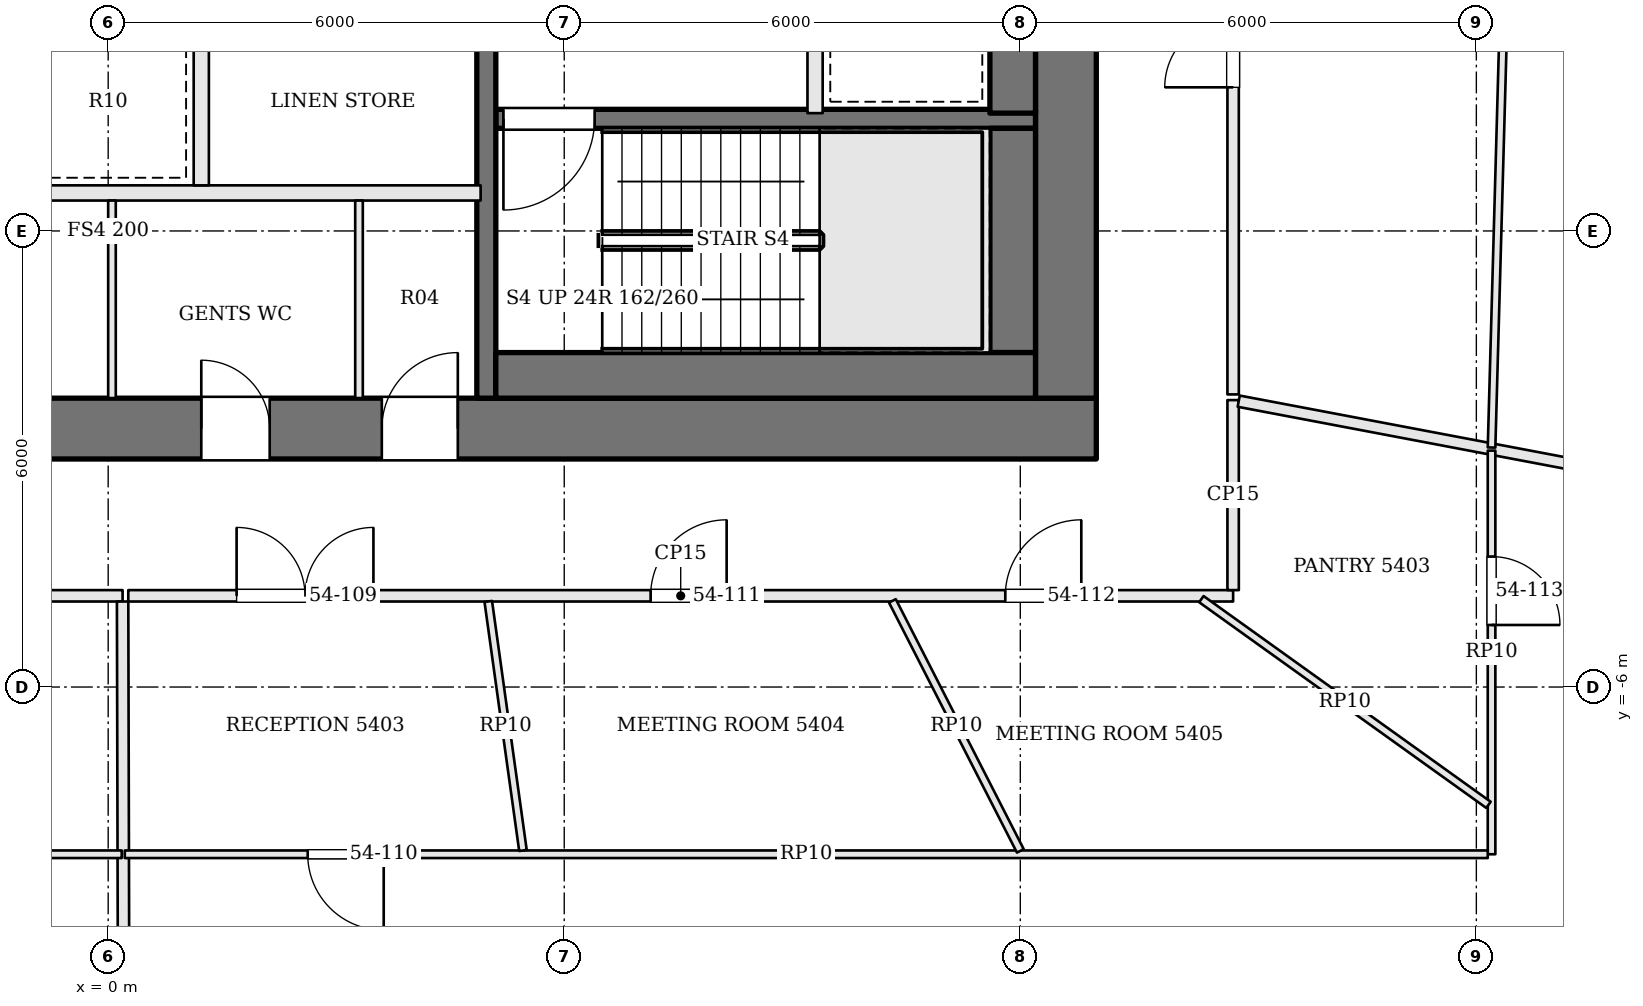
"""IFC4 building model, lengths in metres.
Left out: names, types, materials, properties, quantities, classifications, styles, units other than length and angle.
Written with IfcOpenShell. Run it as: python <this file> out.ifc"""

import sys

from ifc_helpers import new_model, si_unit, direction, frame, frame_2d, origin, place, context, subcontext, project, spatial, rectangle, extrude, element, fill, save


model = new_model("IFC4")
c1 = context("Model", 3, precision=1e-05, world=origin(), true_north=direction((0.0, 1.0)))
c2 = subcontext(c1, "Body", "Model", "MODEL_VIEW")
j1 = project(units=[si_unit("LENGTHUNIT", "METRE"), si_unit("PLANEANGLEUNIT", "RADIAN")], contexts=[c1])
p1 = place(None, origin())
s1 = spatial("IfcSite", under=j1, at=p1, CompositionType="ELEMENT")
p2 = place(p1, origin())
s2 = spatial("IfcBuilding", under=s1, at=p2, CompositionType="ELEMENT")
p3 = place(p2, frame((0.0, 0.0, 221.4)))
s3 = spatial("IfcBuildingStorey", under=s2, at=p3, CompositionType="ELEMENT", Elevation=221.4)
p4 = place(p3, frame((-13.0, -2.6, 0.0), z_axis=(0.0, 0.0, 1.0), x_axis=(1.0, 0.0, 0.0)))
e1 = element("IfcWall", 1, at=p4, inside=s3, PredefinedType="SHEAR", context=c2, shape_type="SweptSolid", body=[
    extrude(rectangle(XDim=26.0, YDim=0.8, at=frame_2d((13.0, 0.0))), origin(), (0.0, 0.0, 1.0), 3.9),
])
p5 = place(p4, frame((8.5, 0.0, 0.0)))
e2 = element("IfcOpeningElement", 2, at=p5, cuts=e1, PredefinedType="OPENING", context=c2, shape_type="SweptSolid", body=[
    extrude(rectangle(XDim=1.0, YDim=2.1, at=frame_2d((0.5, 1.05))), frame((0.0, 0.41, 0.0), z_axis=(0.0, -1.0, 0.0), x_axis=(1.0, 0.0, 0.0)), (0.0, 0.0, 1.0), 0.82),
])
p6 = place(p4, frame((11.025, 0.0, 0.0)))
e3 = element("IfcOpeningElement", 3, at=p6, cuts=e1, PredefinedType="OPENING", context=c2, shape_type="SweptSolid", body=[
    extrude(rectangle(XDim=0.9, YDim=2.1, at=frame_2d((0.45, 1.05))), frame((0.0, 0.41, 0.0), z_axis=(0.0, -1.0, 0.0), x_axis=(1.0, 0.0, 0.0)), (0.0, 0.0, 1.0), 0.82),
])
p7 = place(p4, frame((14.225, 0.0, 0.0)))
e4 = element("IfcOpeningElement", 4, at=p7, cuts=e1, PredefinedType="OPENING", context=c2, shape_type="SweptSolid", body=[
    extrude(rectangle(XDim=0.9, YDim=2.1, at=frame_2d((0.45, 1.05))), frame((0.0, 0.41, 0.0), z_axis=(0.0, -1.0, 0.0), x_axis=(1.0, 0.0, 0.0)), (0.0, 0.0, 1.0), 0.82),
])
p8 = place(p4, frame((16.6, 0.0, 0.0)))
e5 = element("IfcOpeningElement", 5, at=p8, cuts=e1, PredefinedType="OPENING", context=c2, shape_type="SweptSolid", body=[
    extrude(rectangle(XDim=1.0, YDim=2.1, at=frame_2d((0.5, 1.05))), frame((0.0, 0.41, 0.0), z_axis=(0.0, -1.0, 0.0), x_axis=(1.0, 0.0, 0.0)), (0.0, 0.0, 1.0), 0.82),
])
p9 = place(p3, frame((12.6, -2.2, 0.0), z_axis=(0.0, 0.0, 1.0), x_axis=(0.0, 1.0, 0.0)))
e6 = element("IfcWall", 6, at=p9, inside=s3, PredefinedType="SHEAR", context=c2, shape_type="SweptSolid", body=[
    extrude(rectangle(XDim=13.4, YDim=0.8, at=frame_2d((6.7, 0.0))), origin(), (0.0, 0.0, 1.0), 3.9),
])
p10 = place(p9, frame((7.4, 0.0, 0.0)))
e7 = element("IfcOpeningElement", 7, at=p10, cuts=e6, PredefinedType="OPENING", context=c2, shape_type="SweptSolid", body=[
    extrude(rectangle(XDim=1.8, YDim=2.1, at=frame_2d((0.9, 1.05))), frame((0.0, 0.41, 0.0), z_axis=(0.0, -1.0, 0.0), x_axis=(1.0, 0.0, 0.0)), (0.0, 0.0, 1.0), 0.82),
])
p11 = place(p3, frame((12.2, 1.475, 0.0), z_axis=(0.0, 0.0, 1.0), x_axis=(-1.0, 0.0, 0.0)))
e8 = element("IfcWall", 8, at=p11, inside=s3, PredefinedType="SOLIDWALL", context=c2, shape_type="SweptSolid", body=[
    extrude(rectangle(XDim=7.1, YDim=0.25, at=frame_2d((3.55, 0.0))), origin(), (0.0, 0.0, 1.0), 3.7),
])
p12 = place(p11, frame((5.8, 0.0, 0.0)))
e9 = element("IfcOpeningElement", 9, at=p12, cuts=e8, PredefinedType="OPENING", context=c2, shape_type="SweptSolid", body=[
    extrude(rectangle(XDim=1.2, YDim=2.1, at=frame_2d((0.6, 1.05))), frame((0.0, 0.135, 0.0), z_axis=(0.0, -1.0, 0.0), x_axis=(1.0, 0.0, 0.0)), (0.0, 0.0, 1.0), 0.27),
])
p13 = place(p3, frame((9.3, 4.55, 0.0), z_axis=(0.0, 0.0, 1.0), x_axis=(0.0, -1.0, 0.0)))
e10 = element("IfcWall", 10, at=p13, inside=s3, PredefinedType="SOLIDWALL", context=c2, shape_type="SweptSolid", body=[
    extrude(rectangle(XDim=3.0, YDim=0.2, at=frame_2d((1.5, 0.0))), origin(), (0.0, 0.0, 1.0), 3.7),
])
p14 = place(p3, frame((4.975, 11.2, 0.0), z_axis=(0.0, 0.0, 1.0), x_axis=(0.0, -1.0, 0.0)))
e11 = element("IfcWall", 11, at=p14, inside=s3, PredefinedType="SOLIDWALL", context=c2, shape_type="SweptSolid", body=[
    extrude(rectangle(XDim=13.4, YDim=0.25, at=frame_2d((6.7, 0.0))), origin(), (0.0, 0.0, 1.0), 3.7),
])
p15 = place(p14, frame((5.25, 0.0, 0.0)))
e12 = element("IfcOpeningElement", 12, at=p15, cuts=e11, PredefinedType="OPENING", context=c2, shape_type="SweptSolid", body=[
    extrude(rectangle(XDim=1.2, YDim=2.1, at=frame_2d((0.6, 1.05))), frame((0.0, 0.135, 0.0), z_axis=(0.0, -1.0, 0.0), x_axis=(1.0, 0.0, 0.0)), (0.0, 0.0, 1.0), 0.27),
])
p16 = place(p3, frame((11.9, 4.55, 0.0), z_axis=(0.0, 0.0, 1.0), x_axis=(0.0, -1.0, 0.0)))
e13 = element("IfcWall", 13, at=p16, inside=s3, PredefinedType="SOLIDWALL", context=c2, shape_type="SweptSolid", body=[
    extrude(rectangle(XDim=3.0, YDim=0.6, at=frame_2d((1.5, 0.0))), origin(), (0.0, 0.0, 1.0), 3.7),
])
p17 = place(p3, frame((11.9, 1.35, 0.0), z_axis=(0.0, 0.0, 1.0), x_axis=(0.0, -1.0, 0.0)))
e14 = element("IfcWall", 14, at=p17, inside=s3, PredefinedType="SOLIDWALL", context=c2, shape_type="SweptSolid", body=[
    extrude(rectangle(XDim=2.95, YDim=0.6, at=frame_2d((1.475, 0.0))), origin(), (0.0, 0.0, 1.0), 3.7),
])
p18 = place(p3, frame((12.2, -1.9, 0.0), z_axis=(0.0, 0.0, 1.0), x_axis=(-1.0, 0.0, 0.0)))
e15 = element("IfcWall", 15, at=p18, inside=s3, PredefinedType="SOLIDWALL", context=c2, shape_type="SweptSolid", body=[
    extrude(rectangle(XDim=7.1, YDim=0.6, at=frame_2d((3.55, 0.0))), origin(), (0.0, 0.0, 1.0), 3.7),
])
p19 = place(p3, frame((-4.9, 0.5, 0.0), z_axis=(0.0, 0.0, 1.0), x_axis=(1.0, 0.0, 0.0)))
e16 = element("IfcWall", 16, at=p19, inside=s3, PredefinedType="SOLIDWALL", context=c2, shape_type="SweptSolid", body=[
    extrude(rectangle(XDim=9.8, YDim=0.2, at=frame_2d((4.9, 0.0))), origin(), (0.0, 0.0, 1.0), 3.7),
])
p20 = place(p3, frame((1.225, 0.6, 0.0), z_axis=(0.0, 0.0, 1.0), x_axis=(0.0, 1.0, 0.0)))
e17 = element("IfcWall", 17, at=p20, inside=s3, PredefinedType="SOLIDWALL", context=c2, shape_type="SweptSolid", body=[
    extrude(rectangle(XDim=2.2, YDim=0.2, at=frame_2d((1.1, 0.0))), origin(), (0.0, 0.0, 1.0), 3.7),
])
for number, where, z_axis, x_axis in (
    (18, (0.05, -2.2, 0.0), (0.0, 0.0, 1.0), (0.0, 1.0, 0.0)),
    (19, (3.3, -2.2, 0.0), (0.0, 0.0, 1.0), (0.0, 1.0, 0.0)),
):
    element("IfcWall", number, at=place(p3, frame(where, z_axis=z_axis, x_axis=x_axis)), inside=s3, PredefinedType="PARTITIONING", context=c2, shape_type="SweptSolid", body=[
        extrude(rectangle(XDim=2.6, YDim=0.1, at=frame_2d((1.3, 0.0))), origin(), (0.0, 0.0, 1.0), 3.7),
    ])
p21 = place(p3, frame((-14.725, -4.8, 0.0), z_axis=(0.0, 0.0, 1.0), x_axis=(1.0, 0.0, 0.0)))
e20 = element("IfcWall", 20, at=p21, inside=s3, PredefinedType="PARTITIONING", context=c2, shape_type="SweptSolid", body=[
    extrude(rectangle(XDim=14.915, YDim=0.15, at=frame_2d((7.458, 0.0))), origin(), (0.0, 0.0, 1.0), 3.084),
])
p22 = place(p21, frame((0.45, 0.0, 0.0)))
e21 = element("IfcOpeningElement", 21, at=p22, cuts=e20, PredefinedType="OPENING", context=c2, shape_type="SweptSolid", body=[
    extrude(rectangle(XDim=1.8, YDim=2.1, at=frame_2d((0.9, 1.05))), frame((0.0, 0.085, 0.0), z_axis=(0.0, -1.0, 0.0), x_axis=(1.0, 0.0, 0.0)), (0.0, 0.0, 1.0), 0.17),
])
p23 = place(p21, frame((6.522, 0.0, 0.0)))
e22 = element("IfcOpeningElement", 22, at=p23, cuts=e20, PredefinedType="OPENING", context=c2, shape_type="SweptSolid", body=[
    extrude(rectangle(XDim=1.0, YDim=2.4, at=frame_2d((0.5, 1.2))), frame((0.0, 0.085, 0.0), z_axis=(0.0, -1.0, 0.0), x_axis=(1.0, 0.0, 0.0)), (0.0, 0.0, 1.0), 0.17),
])
p24 = place(p21, frame((11.75, 0.0, 0.0)))
e23 = element("IfcOpeningElement", 23, at=p24, cuts=e20, PredefinedType="OPENING", context=c2, shape_type="SweptSolid", body=[
    extrude(rectangle(XDim=1.0, YDim=2.1, at=frame_2d((0.5, 1.05))), frame((0.0, 0.085, 0.0), z_axis=(0.0, -1.0, 0.0), x_axis=(1.0, 0.0, 0.0)), (0.0, 0.0, 1.0), 0.17),
])
p25 = place(p3, frame((0.226, -19.158, 0.0), z_axis=(0.0, 0.0, 1.0), x_axis=(-0.002529819945, 0.9999968, 0.0)))
e24 = element("IfcWall", 24, at=p25, inside=s3, PredefinedType="PARTITIONING", context=c2, shape_type="SweptSolid", body=[
    extrude(rectangle(XDim=14.283, YDim=0.15, at=frame_2d((7.141, 0.0))), origin(), (0.0, 0.0, 1.0), 3.234),
])
p26 = place(p3, frame((0.265, -4.8, 0.0), z_axis=(0.0, 0.0, 1.0), x_axis=(1.0, 0.0, 0.0)))
e25 = element("IfcWall", 25, at=p26, inside=s3, PredefinedType="PARTITIONING", context=c2, shape_type="SweptSolid", body=[
    extrude(rectangle(XDim=14.535, YDim=0.15, at=frame_2d((7.268, 0.0))), origin(), (0.0, 0.0, 1.0), 3.084),
])
p27 = place(p26, frame((1.425, 0.0, 0.0)))
e26 = element("IfcOpeningElement", 26, at=p27, cuts=e25, PredefinedType="OPENING", context=c2, shape_type="SweptSolid", body=[
    extrude(rectangle(XDim=1.8, YDim=2.1, at=frame_2d((0.9, 1.05))), frame((0.0, 0.085, 0.0), z_axis=(0.0, -1.0, 0.0), x_axis=(1.0, 0.0, 0.0)), (0.0, 0.0, 1.0), 0.17),
])
p28 = place(p26, frame((6.872, 0.0, 0.0)))
e27 = element("IfcOpeningElement", 27, at=p28, cuts=e25, PredefinedType="OPENING", context=c2, shape_type="SweptSolid", body=[
    extrude(rectangle(XDim=1.0, YDim=2.4, at=frame_2d((0.5, 1.2))), frame((0.0, 0.085, 0.0), z_axis=(0.0, -1.0, 0.0), x_axis=(1.0, 0.0, 0.0)), (0.0, 0.0, 1.0), 0.17),
])
p29 = place(p26, frame((11.538, 0.0, 0.0)))
e28 = element("IfcOpeningElement", 28, at=p29, cuts=e25, PredefinedType="OPENING", context=c2, shape_type="SweptSolid", body=[
    extrude(rectangle(XDim=1.0, YDim=2.4, at=frame_2d((0.5, 1.2))), frame((0.0, 0.085, 0.0), z_axis=(0.0, -1.0, 0.0), x_axis=(1.0, 0.0, 0.0)), (0.0, 0.0, 1.0), 0.17),
])
p30 = place(p3, frame((14.8, -4.725, 0.0), z_axis=(0.0, 0.0, 1.0), x_axis=(0.0, 1.0, 0.0)))
e29 = element("IfcWall", 29, at=p30, inside=s3, PredefinedType="PARTITIONING", context=c2, shape_type="SweptSolid", body=[
    extrude(rectangle(XDim=2.5, YDim=0.15, at=frame_2d((1.25, 0.0))), origin(), (0.0, 0.0, 1.0), 3.084),
])
p31 = place(p3, frame((26.152, -4.376, 0.0), z_axis=(0.0, 0.0, 1.0), x_axis=(-0.982525172823, 0.186129752508, 0.0)))
e30 = element("IfcWall", 30, at=p31, inside=s3, PredefinedType="PARTITIONING", context=c2, shape_type="SweptSolid", body=[
    extrude(rectangle(XDim=11.479, YDim=0.15, at=frame_2d((5.739, 0.0))), origin(), (0.0, 0.0, 1.0), 3.234),
])
p32 = place(p3, frame((14.8, -2.15, 0.0), z_axis=(0.0, 0.0, 1.0), x_axis=(0.0, 1.0, 0.0)))
e31 = element("IfcWall", 31, at=p32, inside=s3, PredefinedType="PARTITIONING", context=c2, shape_type="SweptSolid", body=[
    extrude(rectangle(XDim=15.95, YDim=0.15, at=frame_2d((7.975, 0.0))), origin(), (0.0, 0.0, 1.0), 3.084),
])
p33 = place(p32, frame((4.04, 0.0, 0.0)))
e32 = element("IfcOpeningElement", 32, at=p33, cuts=e31, PredefinedType="OPENING", context=c2, shape_type="SweptSolid", body=[
    extrude(rectangle(XDim=1.8, YDim=2.1, at=frame_2d((0.9, 1.05))), frame((0.0, 0.085, 0.0), z_axis=(0.0, -1.0, 0.0), x_axis=(1.0, 0.0, 0.0)), (0.0, 0.0, 1.0), 0.17),
])
p34 = place(p32, frame((13.793, 0.0, 0.0)))
e33 = element("IfcOpeningElement", 33, at=p34, cuts=e31, PredefinedType="OPENING", context=c2, shape_type="SweptSolid", body=[
    extrude(rectangle(XDim=1.0, YDim=2.4, at=frame_2d((0.5, 1.2))), frame((0.0, 0.085, 0.0), z_axis=(0.0, -1.0, 0.0), x_axis=(1.0, 0.0, 0.0)), (0.0, 0.0, 1.0), 0.17),
])
p35 = place(p3, frame((0.178, -8.2, 0.0), z_axis=(0.0, 0.0, 1.0), x_axis=(-1.0, 0.0, 0.0)))
e34 = element("IfcWall", 34, at=p35, inside=s3, PredefinedType="PARTITIONING", context=c2, shape_type="SweptSolid", body=[
    extrude(rectangle(XDim=18.328, YDim=0.1, at=frame_2d((9.164, 0.0))), origin(), (0.0, 0.0, 1.0), 3.084),
])
p36 = place(p35, frame((2.668, 0.0, 0.0)))
e35 = element("IfcOpeningElement", 35, at=p36, cuts=e34, PredefinedType="OPENING", context=c2, shape_type="SweptSolid", body=[
    extrude(rectangle(XDim=0.9, YDim=2.1, at=frame_2d((0.45, 1.05))), frame((0.0, 0.06, 0.0), z_axis=(0.0, -1.0, 0.0), x_axis=(1.0, 0.0, 0.0)), (0.0, 0.0, 1.0), 0.12),
])
p37 = place(p35, frame((7.65, 0.0, 0.0)))
e36 = element("IfcOpeningElement", 36, at=p37, cuts=e34, PredefinedType="OPENING", context=c2, shape_type="SweptSolid", body=[
    extrude(rectangle(XDim=1.0, YDim=2.4, at=frame_2d((0.5, 1.2))), frame((0.0, 0.06, 0.0), z_axis=(0.0, -1.0, 0.0), x_axis=(1.0, 0.0, 0.0)), (0.0, 0.0, 1.0), 0.12),
])
p38 = place(p3, frame((18.2, -2.89, 0.0), z_axis=(0.0, 0.0, 1.0), x_axis=(0.0, -1.0, 0.0)))
e37 = element("IfcWall", 37, at=p38, inside=s3, PredefinedType="PARTITIONING", context=c2, shape_type="SweptSolid", body=[
    extrude(rectangle(XDim=5.31, YDim=0.1, at=frame_2d((2.655, 0.0))), origin(), (0.0, 0.0, 1.0), 3.084),
])
p39 = place(p38, frame((1.394, 0.0, 0.0)))
e38 = element("IfcOpeningElement", 38, at=p39, cuts=e37, PredefinedType="OPENING", context=c2, shape_type="SweptSolid", body=[
    extrude(rectangle(XDim=0.9, YDim=2.1, at=frame_2d((0.45, 1.05))), frame((0.0, 0.06, 0.0), z_axis=(0.0, -1.0, 0.0), x_axis=(1.0, 0.0, 0.0)), (0.0, 0.0, 1.0), 0.12),
])
p40 = place(p3, frame((18.15, -8.2, 0.0), z_axis=(0.0, 0.0, 1.0), x_axis=(-1.0, 0.0, 0.0)))
e39 = element("IfcWall", 39, at=p40, inside=s3, PredefinedType="PARTITIONING", context=c2, shape_type="SweptSolid", body=[
    extrude(rectangle(XDim=17.932, YDim=0.1, at=frame_2d((8.966, 0.0))), origin(), (0.0, 0.0, 1.0), 3.084),
])
p41 = place(p40, frame((14.525, 0.0, 0.0)))
e40 = element("IfcOpeningElement", 40, at=p41, cuts=e39, PredefinedType="OPENING", context=c2, shape_type="SweptSolid", body=[
    extrude(rectangle(XDim=1.0, YDim=2.1, at=frame_2d((0.5, 1.05))), frame((0.0, 0.06, 0.0), z_axis=(0.0, -1.0, 0.0), x_axis=(1.0, 0.0, 0.0)), (0.0, 0.0, 1.0), 0.12),
])
p42 = place(p3, frame((5.0, -4.874, 0.0), z_axis=(0.0, 0.0, 1.0), x_axis=(0.138020926677, -0.990429312874, 0.0)))
e41 = element("IfcWall", 41, at=p42, inside=s3, PredefinedType="PARTITIONING", context=c2, shape_type="SweptSolid", body=[
    extrude(rectangle(XDim=3.308, YDim=0.1, at=frame_2d((1.654, 0.0))), origin(), (0.0, 0.0, 1.0), 3.084),
])
p43 = place(p3, frame((10.317, -4.867, 0.0), z_axis=(0.0, 0.0, 1.0), x_axis=(0.455573240095, -0.890198305384, 0.0)))
e42 = element("IfcWall", 42, at=p43, inside=s3, PredefinedType="PARTITIONING", context=c2, shape_type="SweptSolid", body=[
    extrude(rectangle(XDim=3.695, YDim=0.1, at=frame_2d((1.847, 0.0))), origin(), (0.0, 0.0, 1.0), 3.084),
])
p44 = place(p3, frame((14.382, -4.844, 0.0), z_axis=(0.0, 0.0, 1.0), x_axis=(0.812905436978, -0.582395699273, 0.0)))
e43 = element("IfcWall", 43, at=p44, inside=s3, PredefinedType="PARTITIONING", context=c2, shape_type="SweptSolid", body=[
    extrude(rectangle(XDim=4.646, YDim=0.1, at=frame_2d((2.323, 0.0))), origin(), (0.0, 0.0, 1.0), 3.084),
])
p45 = place(p3, frame((18.639, 12.909, 0.0), z_axis=(0.0, 0.0, 1.0), x_axis=(-0.027844870204, -0.999612256429, 0.0)))
e44 = element("IfcWall", 44, at=p45, inside=s3, PredefinedType="PARTITIONING", context=c2, shape_type="SweptSolid", body=[
    extrude(rectangle(XDim=15.765, YDim=0.1, at=frame_2d((7.882, 0.0))), origin(), (0.0, 0.0, 1.0), 3.084),
])
p46 = place(p45, frame((9.403, 0.0, 0.0)))
e45 = element("IfcOpeningElement", 45, at=p46, cuts=e44, PredefinedType="OPENING", context=c2, shape_type="SweptSolid", body=[
    extrude(rectangle(XDim=1.0, YDim=2.1, at=frame_2d((0.5, 1.05))), frame((0.0, 0.06, 0.0), z_axis=(0.0, -1.0, 0.0), x_axis=(1.0, 0.0, 0.0)), (0.0, 0.0, 1.0), 0.12),
])
p47 = place(p12, origin())
e46 = element("IfcDoor", 46, at=p47, inside=s3, OperationType="SINGLE_SWING_RIGHT", PredefinedType="DOOR", context=c2, shape_type="SweptSolid", body=[
    extrude(rectangle(XDim=1.2, YDim=2.1, at=frame_2d((0.6, 1.05))), frame((0.0, 0.025, 0.0), z_axis=(0.0, -1.0, 0.0), x_axis=(1.0, 0.0, 0.0)), (0.0, 0.0, 1.0), 0.05),
])
fill(e9, e46)
p48 = place(p7, origin())
e47 = element("IfcDoor", 47, at=p48, inside=s3, OperationType="SINGLE_SWING_LEFT", PredefinedType="DOOR", context=c2, shape_type="SweptSolid", body=[
    extrude(rectangle(XDim=0.9, YDim=2.1, at=frame_2d((0.45, 1.05))), frame((0.0, 0.025, 0.0), z_axis=(0.0, -1.0, 0.0), x_axis=(1.0, 0.0, 0.0)), (0.0, 0.0, 1.0), 0.05),
])
fill(e4, e47)
p49 = place(p8, origin())
e48 = element("IfcDoor", 48, at=p49, inside=s3, OperationType="SINGLE_SWING_RIGHT", PredefinedType="DOOR", context=c2, shape_type="SweptSolid", body=[
    extrude(rectangle(XDim=1.0, YDim=2.1, at=frame_2d((0.5, 1.05))), frame((0.0, 0.025, 0.0), z_axis=(0.0, -1.0, 0.0), x_axis=(1.0, 0.0, 0.0)), (0.0, 0.0, 1.0), 0.05),
])
fill(e5, e48)
p50 = place(p27, origin())
e49 = element("IfcDoor", 49, at=p50, inside=s3, OperationType="DOUBLE_DOOR_SINGLE_SWING", PredefinedType="DOOR", context=c2, shape_type="SweptSolid", body=[
    extrude(rectangle(XDim=1.8, YDim=2.1, at=frame_2d((0.9, 1.05))), frame((0.0, 0.025, 0.0), z_axis=(0.0, -1.0, 0.0), x_axis=(1.0, 0.0, 0.0)), (0.0, 0.0, 1.0), 0.05),
])
fill(e26, e49)
p51 = place(p41, origin())
e50 = element("IfcDoor", 50, at=p51, inside=s3, OperationType="SINGLE_SWING_LEFT", PredefinedType="DOOR", context=c2, shape_type="SweptSolid", body=[
    extrude(rectangle(XDim=1.0, YDim=2.1, at=frame_2d((0.5, 1.05))), frame((0.0, 0.025, 0.0), z_axis=(0.0, -1.0, 0.0), x_axis=(1.0, 0.0, 0.0)), (0.0, 0.0, 1.0), 0.05),
])
fill(e40, e50)
p52 = place(p28, origin())
e51 = element("IfcDoor", 51, at=p52, inside=s3, OperationType="SINGLE_SWING_RIGHT", PredefinedType="DOOR", context=c2, shape_type="SweptSolid", body=[
    extrude(rectangle(XDim=1.0, YDim=2.4, at=frame_2d((0.5, 1.2))), frame((0.0, 0.025, 0.0), z_axis=(0.0, -1.0, 0.0), x_axis=(1.0, 0.0, 0.0)), (0.0, 0.0, 1.0), 0.05),
])
fill(e27, e51)
p53 = place(p29, origin())
e52 = element("IfcDoor", 52, at=p53, inside=s3, OperationType="SINGLE_SWING_RIGHT", PredefinedType="DOOR", context=c2, shape_type="SweptSolid", body=[
    extrude(rectangle(XDim=1.0, YDim=2.4, at=frame_2d((0.5, 1.2))), frame((0.0, 0.025, 0.0), z_axis=(0.0, -1.0, 0.0), x_axis=(1.0, 0.0, 0.0)), (0.0, 0.0, 1.0), 0.05),
])
fill(e28, e52)
p54 = place(p39, origin())
e53 = element("IfcDoor", 53, at=p54, inside=s3, OperationType="SINGLE_SWING_RIGHT", PredefinedType="DOOR", context=c2, shape_type="SweptSolid", body=[
    extrude(rectangle(XDim=0.9, YDim=2.1, at=frame_2d((0.45, 1.05))), frame((0.0, 0.025, 0.0), z_axis=(0.0, -1.0, 0.0), x_axis=(1.0, 0.0, 0.0)), (0.0, 0.0, 1.0), 0.05),
])
fill(e38, e53)
p55 = place(p33, origin())
e54 = element("IfcDoor", 54, at=p55, inside=s3, OperationType="DOUBLE_DOOR_SINGLE_SWING", PredefinedType="DOOR", context=c2, shape_type="SweptSolid", body=[
    extrude(rectangle(XDim=1.8, YDim=2.1, at=frame_2d((0.9, 1.05))), frame((0.0, 0.025, 0.0), z_axis=(0.0, -1.0, 0.0), x_axis=(1.0, 0.0, 0.0)), (0.0, 0.0, 1.0), 0.05),
])
fill(e32, e54)
save(model, sys.argv[1])
